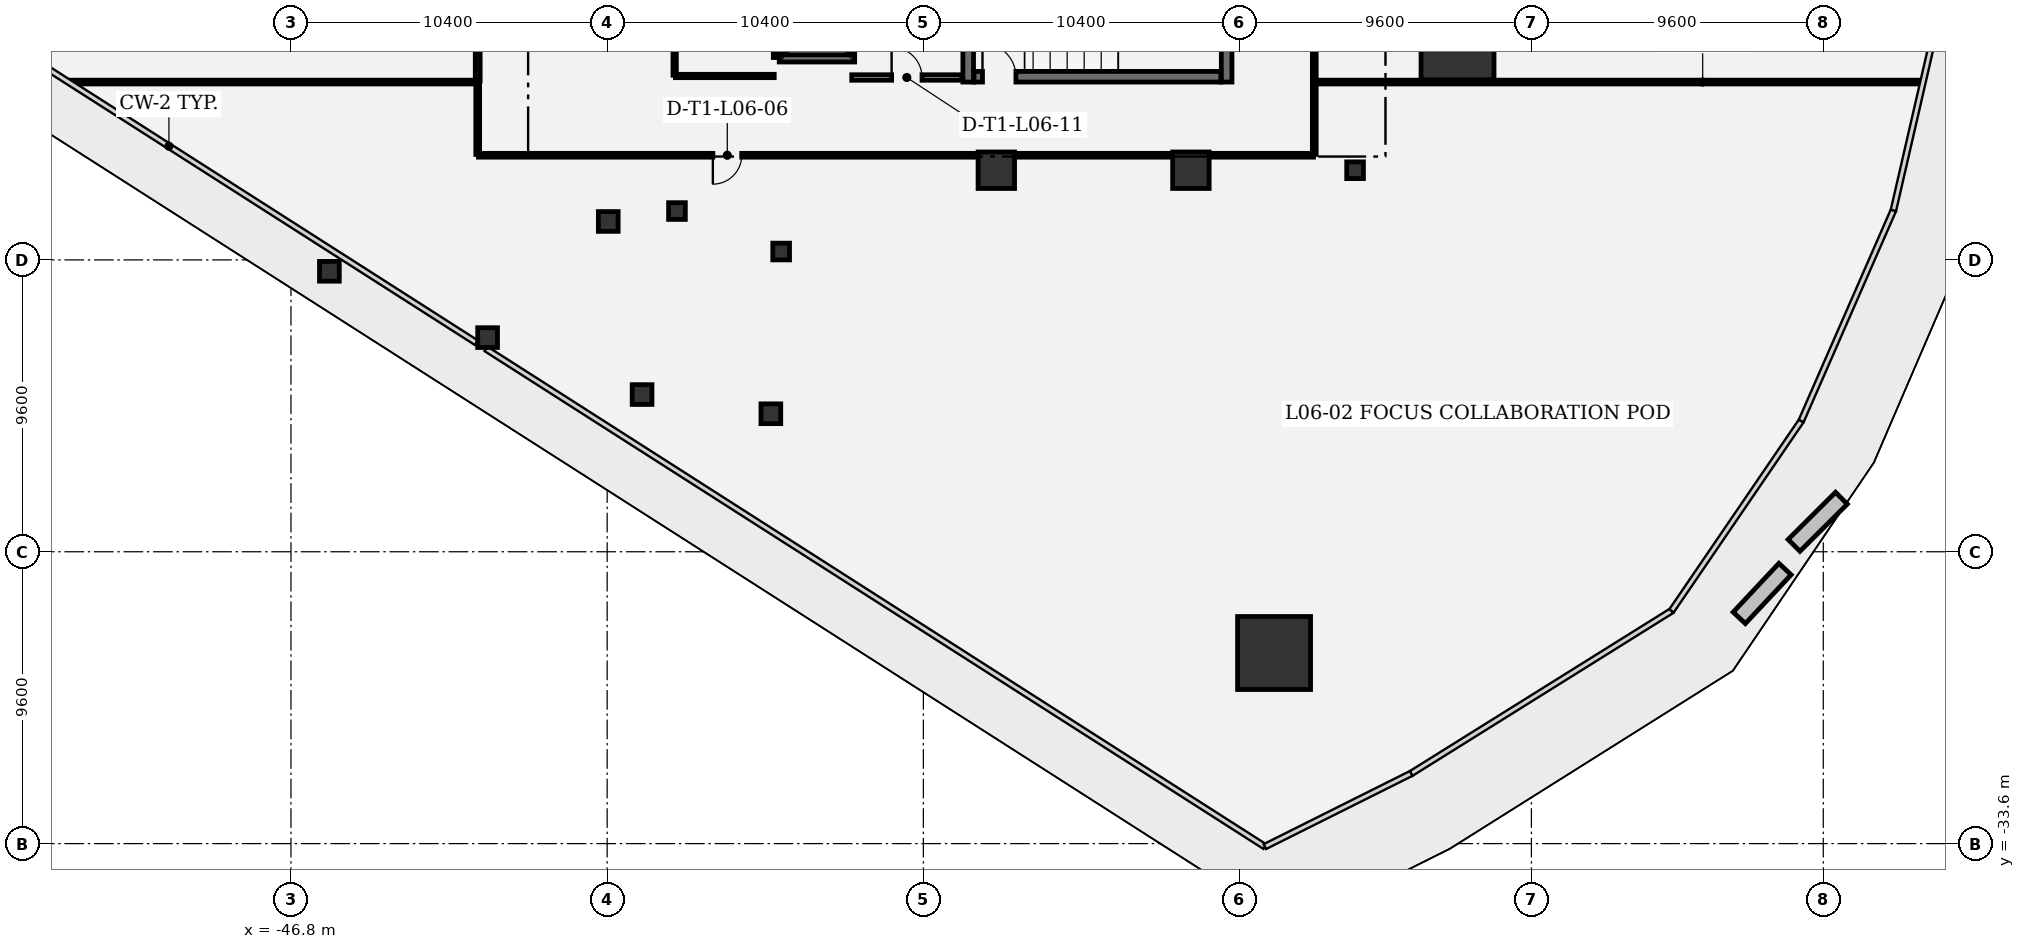
"""IFC4 building model, lengths in metres.
Left out: names, types, materials, properties, quantities, classifications, styles, units other than length and angle.
Written with IfcOpenShell. Run it as: python <this file> out.ifc"""

import sys

from ifc_helpers import new_model, si_unit, direction, frame, frame_2d, origin, origin_2d, place, context, subcontext, project, spatial, rectangle, extrude, element, fill, save


model = new_model("IFC4")
c1 = context("Model", 3, precision=1e-05, world=origin(), true_north=direction((0.0, 1.0)))
c2 = subcontext(c1, "Body", "Model", "MODEL_VIEW")
j1 = project(units=[si_unit("LENGTHUNIT", "METRE"), si_unit("PLANEANGLEUNIT", "RADIAN")], contexts=[c1])
p1 = place(None, origin())
s1 = spatial("IfcSite", under=j1, at=p1, CompositionType="ELEMENT")
p2 = place(p1, origin())
s2 = spatial("IfcBuilding", under=s1, at=p2, CompositionType="ELEMENT")
p3 = place(p2, frame((0.0, 0.0, 32.4)))
s3 = spatial("IfcBuildingStorey", under=s2, at=p3, CompositionType="ELEMENT", Elevation=32.4)
for number, where, z_axis, x_axis in (
    (1, (-14.464, -27.331, 0.0), (0.0, 0.0, 1.0), (1.0, 0.0, 0.0)),
    (2, (-8.43, -7.276, 0.0), (0.0, 0.0, 1.0), (1.0, 0.0, 0.0)),
):
    element("IfcColumn", number, at=place(p3, frame(where, z_axis=z_axis, x_axis=x_axis)), inside=s3, PredefinedType="COLUMN", context=c2, shape_type="SweptSolid", body=[
        extrude(rectangle(XDim=2.4, YDim=2.4, at=origin_2d()), origin(), (0.0, 0.0, 1.0), 4.2),
    ])
for number, where, z_axis, x_axis in (
    (3, (-17.2, -11.45, 0.0), (0.0, 0.0, 1.0), (1.0, 0.0, 0.0)),
    (4, (-23.6, -11.45, 0.0), (0.0, 0.0, 1.0), (1.0, 0.0, 0.0)),
):
    element("IfcColumn", number, at=place(p3, frame(where, z_axis=z_axis, x_axis=x_axis)), inside=s3, PredefinedType="COLUMN", context=c2, shape_type="SweptSolid", body=[
        extrude(rectangle(XDim=1.2, YDim=1.2, at=origin_2d()), origin(), (0.0, 0.0, 1.0), 4.2),
    ])
for number, where, z_axis, x_axis in (
    (5, (-45.536, -14.775, 0.0), (0.0, 0.0, 1.0), (1.0, 0.0, 0.0)),
    (6, (-40.333, -16.956, 0.0), (0.0, 0.0, 1.0), (1.0, 0.0, 0.0)),
    (7, (-35.252, -18.829, 0.0), (0.0, 0.0, 1.0), (1.0, 0.0, 0.0)),
    (8, (-31.016, -19.46, 0.0), (0.0, 0.0, 1.0), (1.0, 0.0, 0.0)),
    (9, (-36.365, -13.135, 0.0), (0.0, 0.0, 1.0), (1.0, 0.0, 0.0)),
):
    element("IfcColumn", number, at=place(p3, frame(where, z_axis=z_axis, x_axis=x_axis)), inside=s3, PredefinedType="COLUMN", context=c2, shape_type="SweptSolid", body=[
        extrude(rectangle(XDim=0.65, YDim=0.65, at=origin_2d()), origin(), (0.0, 0.0, 1.0), 4.2),
    ])
for number, where, z_axis, x_axis in (
    (10, (-34.104, -12.792, 0.0), (0.0, 0.0, 1.0), (1.0, 0.0, 0.0)),
    (11, (-30.677, -14.124, 0.0), (0.0, 0.0, 1.0), (1.0, 0.0, 0.0)),
    (12, (-11.8, -11.45, 0.0), (0.0, 0.0, 1.0), (1.0, 0.0, 0.0)),
):
    element("IfcColumn", number, at=place(p3, frame(where, z_axis=z_axis, x_axis=x_axis)), inside=s3, PredefinedType="COLUMN", context=c2, shape_type="SweptSolid", body=[
        extrude(rectangle(XDim=0.55, YDim=0.55, at=origin_2d()), origin(), (0.0, 0.0, 1.0), 4.2),
    ])
p4 = place(p3, frame((-24.525, -4.34, 0.0), z_axis=(0.0, 0.0, 1.0), x_axis=(0.0, -1.0, 0.0)))
e13 = element("IfcWall", 13, at=p4, inside=s3, PredefinedType="SHEAR", context=c2, shape_type="SweptSolid", body=[
    extrude(rectangle(XDim=4.21, YDim=0.35, at=frame_2d((2.105, 0.0))), origin(), (0.0, 0.0, 1.0), 3.92),
])
p5 = place(p3, frame((-16.025, -8.55, 0.0), z_axis=(0.0, 0.0, 1.0), x_axis=(0.0, 1.0, 0.0)))
e14 = element("IfcWall", 14, at=p5, inside=s3, PredefinedType="SHEAR", context=c2, shape_type="SweptSolid", body=[
    extrude(rectangle(XDim=4.61, YDim=0.35, at=frame_2d((2.305, 0.0))), origin(), (0.0, 0.0, 1.0), 3.92),
])
p6 = place(p3, frame((-24.335, -8.375, 0.0), z_axis=(0.0, 0.0, 1.0), x_axis=(1.0, 0.0, 0.0)))
e15 = element("IfcWall", 15, at=p6, inside=s3, PredefinedType="SHEAR", context=c2, shape_type="SweptSolid", body=[
    extrude(rectangle(XDim=8.12, YDim=0.35, at=frame_2d((4.06, 0.0))), origin(), (0.0, 0.0, 1.0), 3.92),
])
p7 = place(p6, frame((0.28, 0.0, 0.0)))
e16 = element("IfcOpeningElement", 16, at=p7, cuts=e15, PredefinedType="OPENING", context=c2, shape_type="SweptSolid", body=[
    extrude(rectangle(XDim=1.1, YDim=2.2, at=frame_2d((0.55, 1.1))), frame((0.0, 0.185, 0.0), z_axis=(0.0, -1.0, 0.0), x_axis=(1.0, 0.0, 0.0)), (0.0, 0.0, 1.0), 0.37),
])
p8 = place(p3, frame((-28.26, -7.77, 0.0), z_axis=(0.0, 0.0, 1.0), x_axis=(-1.0, 0.0, 0.0)))
e17 = element("IfcWall", 17, at=p8, inside=s3, PredefinedType="SHEAR", context=c2, shape_type="SweptSolid", body=[
    extrude(rectangle(XDim=2.48, YDim=0.24, at=frame_2d((1.24, 0.0))), origin(), (0.0, 0.0, 1.0), 3.92),
])
p9 = place(p3, frame((-30.62, -7.638, 0.0), z_axis=(0.0, 0.0, 1.0), x_axis=(0.0, 1.0, 0.0)))
e18 = element("IfcWall", 18, at=p9, inside=s3, PredefinedType="SHEAR", context=c2, shape_type="SweptSolid", body=[
    extrude(rectangle(XDim=2.376, YDim=0.24, at=frame_2d((1.188, 0.0))), origin(), (0.0, 0.0, 1.0), 3.92),
])
p10 = place(p3, frame((-28.38, -5.262, 0.0), z_axis=(0.0, 0.0, 1.0), x_axis=(0.0, -1.0, 0.0)))
e19 = element("IfcWall", 19, at=p10, inside=s3, PredefinedType="SHEAR", context=c2, shape_type="SweptSolid", body=[
    extrude(rectangle(XDim=2.376, YDim=0.24, at=frame_2d((1.188, 0.0))), origin(), (0.0, 0.0, 1.0), 3.92),
])
p11 = place(p10, frame((0.538, 0.0, 0.0)))
e20 = element("IfcOpeningElement", 20, at=p11, cuts=e19, PredefinedType="OPENING", context=c2, shape_type="SweptSolid", body=[
    extrude(rectangle(XDim=1.3, YDim=2.3, at=frame_2d((0.65, 1.15))), frame((0.0, 0.13, 0.0), z_axis=(0.0, -1.0, 0.0), x_axis=(1.0, 0.0, 0.0)), (0.0, 0.0, 1.0), 0.26),
])
p12 = place(p3, frame((-28.355, -8.4, 0.0), z_axis=(0.0, 0.0, 1.0), x_axis=(1.0, 0.0, 0.0)))
e21 = element("IfcWall", 21, at=p12, inside=s3, PredefinedType="PARTITIONING", context=c2, shape_type="SweptSolid", body=[
    extrude(rectangle(XDim=3.622, YDim=0.18, at=frame_2d((1.811, 0.0))), origin(), (0.0, 0.0, 1.0), 3.92),
])
p13 = place(p12, frame((1.311, 0.0, 0.0)))
e22 = element("IfcOpeningElement", 22, at=p13, cuts=e21, PredefinedType="OPENING", context=c2, shape_type="SweptSolid", body=[
    extrude(rectangle(XDim=1.0, YDim=2.15, at=frame_2d((0.5, 1.075))), frame((0.0, 0.1, 0.0), z_axis=(0.0, -1.0, 0.0), x_axis=(1.0, 0.0, 0.0)), (0.0, 0.0, 1.0), 0.2),
])
p14 = place(p3, frame((-34.155, -8.35, 0.0), z_axis=(0.0, 0.0, 1.0), x_axis=(1.0, 0.0, 0.0)))
e23 = element("IfcWall", 23, at=p14, inside=s3, PredefinedType="PARTITIONING", context=c2, shape_type="SweptSolid", body=[
    extrude(rectangle(XDim=3.25, YDim=0.11, at=frame_2d((1.625, 0.0))), origin(), (0.0, 0.0, 1.0), 3.92),
])
p15 = place(p3, frame((-30.88, -7.743, 0.0), z_axis=(0.0, 0.0, 1.0), x_axis=(0.0, 1.0, 0.0)))
e24 = element("IfcWall", 24, at=p15, inside=s3, PredefinedType="PARTITIONING", context=c2, shape_type="SweptSolid", body=[
    extrude(rectangle(XDim=1.928, YDim=0.11, at=frame_2d((0.964, 0.0))), origin(), (0.0, 0.0, 1.0), 3.92),
])
p16 = place(p3, frame((-34.18, -5.075, 0.0), z_axis=(0.0, 0.0, 1.0), x_axis=(0.0, -1.0, 0.0)))
e25 = element("IfcWall", 25, at=p16, inside=s3, PredefinedType="PARTITIONING", context=c2, shape_type="SweptSolid", body=[
    extrude(rectangle(XDim=3.25, YDim=0.11, at=frame_2d((1.625, 0.0))), origin(), (0.0, 0.0, 1.0), 3.92),
])
p17 = place(p16, frame((1.185, 0.0, 0.0)))
e26 = element("IfcOpeningElement", 26, at=p17, cuts=e25, PredefinedType="OPENING", context=c2, shape_type="SweptSolid", body=[
    extrude(rectangle(XDim=0.88, YDim=2.1, at=frame_2d((0.44, 1.05))), frame((0.0, 0.065, 0.0), z_axis=(0.0, -1.0, 0.0), x_axis=(1.0, 0.0, 0.0)), (0.0, 0.0, 1.0), 0.13),
])
p18 = place(p3, frame((6.799, -8.55, 0.0), z_axis=(0.0, 0.0, 1.0), x_axis=(-1.0, 0.0, 0.0)))
e27 = element("IfcWall", 27, at=p18, inside=s3, PredefinedType="PARTITIONING", context=c2, shape_type="SweptSolid", body=[
    extrude(rectangle(XDim=19.916, YDim=0.125, at=frame_2d((9.958, 0.0))), origin(), (0.0, 0.0, 1.0), 2.957),
])
p19 = place(p3, frame((-13.142, -10.933, 0.0), z_axis=(0.0, 0.0, 1.0), x_axis=(0.0, 1.0, 0.0)))
e28 = element("IfcWall", 28, at=p19, inside=s3, PredefinedType="PARTITIONING", context=c2, shape_type="SweptSolid", body=[
    extrude(rectangle(XDim=2.358, YDim=0.125, at=frame_2d((1.179, 0.0))), origin(), (0.0, 0.0, 1.0), 3.92),
])
p20 = place(p3, frame((-13.167, -10.958, 0.0), z_axis=(0.0, 0.0, 1.0), x_axis=(-1.0, 0.0, 0.0)))
e29 = element("IfcWall", 29, at=p20, inside=s3, PredefinedType="PARTITIONING", context=c2, shape_type="SweptSolid", body=[
    extrude(rectangle(XDim=3.368, YDim=0.125, at=frame_2d((1.684, 0.0))), origin(), (0.0, 0.0, 1.0), 2.957),
])
p21 = place(p3, frame((-17.865, -10.958, 0.0), z_axis=(0.0, 0.0, 1.0), x_axis=(-1.0, 0.0, 0.0)))
e30 = element("IfcWall", 30, at=p21, inside=s3, PredefinedType="PARTITIONING", context=c2, shape_type="SweptSolid", body=[
    extrude(rectangle(XDim=5.07, YDim=0.125, at=frame_2d((2.535, 0.0))), origin(), (0.0, 0.0, 1.0), 3.92),
])
p22 = place(p3, frame((-24.265, -10.958, 0.0), z_axis=(0.0, 0.0, 1.0), x_axis=(-1.0, 0.0, 0.0)))
e31 = element("IfcWall", 31, at=p22, inside=s3, PredefinedType="PARTITIONING", context=c2, shape_type="SweptSolid", body=[
    extrude(rectangle(XDim=16.368, YDim=0.125, at=frame_2d((8.184, 0.0))), origin(), (0.0, 0.0, 1.0), 3.433),
])
p23 = place(p22, frame((7.709, 0.0, 0.0)))
e32 = element("IfcOpeningElement", 32, at=p23, cuts=e31, PredefinedType="OPENING", context=c2, shape_type="SweptSolid", body=[
    extrude(rectangle(XDim=0.95, YDim=2.15, at=frame_2d((0.475, 1.075))), frame((0.0, 0.073, 0.0), z_axis=(0.0, -1.0, 0.0), x_axis=(1.0, 0.0, 0.0)), (0.0, 0.0, 1.0), 0.145),
])
p24 = place(p3, frame((-40.658, -8.575, 0.0), z_axis=(0.0, 0.0, 1.0), x_axis=(0.0, -1.0, 0.0)))
e33 = element("IfcWall", 33, at=p24, inside=s3, PredefinedType="PARTITIONING", context=c2, shape_type="SweptSolid", body=[
    extrude(rectangle(XDim=2.358, YDim=0.125, at=frame_2d((1.179, 0.0))), origin(), (0.0, 0.0, 1.0), 3.92),
])
p25 = place(p3, frame((-40.683, -8.55, 0.0), z_axis=(0.0, 0.0, 1.0), x_axis=(-1.0, 0.0, 0.0)))
e34 = element("IfcWall", 34, at=p25, inside=s3, PredefinedType="PARTITIONING", context=c2, shape_type="SweptSolid", body=[
    extrude(rectangle(XDim=13.353, YDim=0.125, at=frame_2d((6.676, 0.0))), origin(), (0.0, 0.0, 1.0), 2.89),
])
p26 = place(p3, frame((-13.142, -2.668, 0.0), z_axis=(0.0, 0.0, 1.0), x_axis=(0.0, -1.0, 0.0)))
e35 = element("IfcWall", 35, at=p26, inside=s3, PredefinedType="PARTITIONING", context=c2, shape_type="SweptSolid", body=[
    extrude(rectangle(XDim=5.849, YDim=0.125, at=frame_2d((2.924, 0.0))), origin(), (0.0, 0.0, 1.0), 3.92),
])
p27 = place(p26, frame((2.449, 0.0, 0.0)))
e36 = element("IfcOpeningElement", 36, at=p27, cuts=e35, PredefinedType="OPENING", context=c2, shape_type="SweptSolid", body=[
    extrude(rectangle(XDim=0.95, YDim=2.15, at=frame_2d((0.475, 1.075))), frame((0.0, 0.073, 0.0), z_axis=(0.0, -1.0, 0.0), x_axis=(1.0, 0.0, 0.0)), (0.0, 0.0, 1.0), 0.145),
])
p28 = place(p3, frame((-40.658, -8.517, 0.0), z_axis=(0.0, 0.0, 1.0), x_axis=(0.0, 1.0, 0.0)))
e37 = element("IfcWall", 37, at=p28, inside=s3, PredefinedType="PARTITIONING", context=c2, shape_type="SweptSolid", body=[
    extrude(rectangle(XDim=16.834, YDim=0.16, at=frame_2d((8.417, 0.0))), origin(), (0.0, 0.0, 1.0), 3.92),
])
p29 = place(p28, frame((7.867, 0.0, 0.0)))
e38 = element("IfcOpeningElement", 38, at=p29, cuts=e37, PredefinedType="OPENING", context=c2, shape_type="SweptSolid", body=[
    extrude(rectangle(XDim=1.1, YDim=2.15, at=frame_2d((0.55, 1.075))), frame((0.0, 0.09, 0.0), z_axis=(0.0, -1.0, 0.0), x_axis=(1.0, 0.0, 0.0)), (0.0, 0.0, 1.0), 0.18),
])
p30 = place(p7, origin())
e39 = element("IfcDoor", 39, at=p30, inside=s3, OperationType="SINGLE_SWING_LEFT", PredefinedType="DOOR", context=c2, shape_type="SweptSolid", body=[
    extrude(rectangle(XDim=1.1, YDim=2.2, at=frame_2d((0.55, 1.1))), frame((0.0, 0.025, 0.0), z_axis=(0.0, -1.0, 0.0), x_axis=(1.0, 0.0, 0.0)), (0.0, 0.0, 1.0), 0.05),
])
fill(e16, e39)
p31 = place(p23, origin())
e40 = element("IfcDoor", 40, at=p31, inside=s3, OperationType="SINGLE_SWING_RIGHT", PredefinedType="DOOR", context=c2, shape_type="SweptSolid", body=[
    extrude(rectangle(XDim=0.95, YDim=2.15, at=frame_2d((0.475, 1.075))), frame((0.0, 0.025, 0.0), z_axis=(0.0, -1.0, 0.0), x_axis=(1.0, 0.0, 0.0)), (0.0, 0.0, 1.0), 0.05),
])
fill(e32, e40)
p32 = place(p13, origin())
e41 = element("IfcDoor", 41, at=p32, inside=s3, OperationType="SINGLE_SWING_LEFT", PredefinedType="DOOR", context=c2, shape_type="SweptSolid", body=[
    extrude(rectangle(XDim=1.0, YDim=2.15, at=frame_2d((0.5, 1.075))), frame((0.0, 0.025, 0.0), z_axis=(0.0, -1.0, 0.0), x_axis=(1.0, 0.0, 0.0)), (0.0, 0.0, 1.0), 0.05),
])
fill(e22, e41)
save(model, sys.argv[1])
